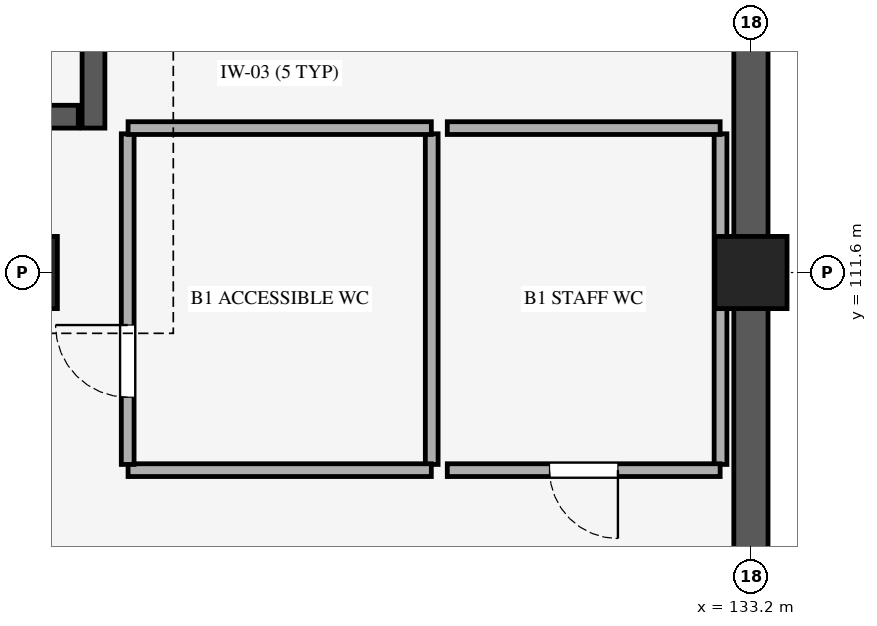
"""IFC4 building model, lengths in metres.
Left out: names, types, materials, properties, quantities, classifications, styles, units other than length and angle.
Written with IfcOpenShell. Run it as: python <this file> out.ifc"""

import sys

from ifc_helpers import new_model, si_unit, direction, frame, frame_2d, origin, origin_2d, place, context, subcontext, project, spatial, rectangle, extrude, element, fill, save


model = new_model("IFC4")
c1 = context("Model", 3, precision=1e-05, world=origin(), true_north=direction((0.0, 1.0)))
c2 = subcontext(c1, "Body", "Model", "MODEL_VIEW")
j1 = project(units=[si_unit("LENGTHUNIT", "METRE"), si_unit("PLANEANGLEUNIT", "RADIAN")], contexts=[c1])
p1 = place(None, origin())
s1 = spatial("IfcSite", under=j1, at=p1, CompositionType="ELEMENT")
p2 = place(p1, origin())
s2 = spatial("IfcBuilding", under=s1, at=p2, CompositionType="ELEMENT")
p3 = place(p2, frame((0.0, 0.0, -4.8)))
s3 = spatial("IfcBuildingStorey", under=s2, at=p3, CompositionType="ELEMENT", Elevation=-4.8)
for number, where, z_axis, x_axis in (
    (1, (123.6, 111.6, 0.0), (0.0, 0.0, 1.0), (1.0, 0.0, 0.0)),
    (2, (133.2, 111.6, 0.0), (0.0, 0.0, 1.0), (1.0, 0.0, 0.0)),
):
    element("IfcColumn", number, at=place(p3, frame(where, z_axis=z_axis, x_axis=x_axis)), inside=s3, PredefinedType="COLUMN", context=c2, shape_type="SweptSolid", body=[
        extrude(rectangle(XDim=0.95, YDim=0.95, at=origin_2d()), origin(), (0.0, 0.0, 1.0), 4.8),
    ])
p4 = place(p3, frame((133.2, 118.56, 0.0), z_axis=(0.0, 0.0, 1.0), x_axis=(0.0, -1.0, 0.0)))
e3 = element("IfcWall", 3, at=p4, inside=s3, PredefinedType="USERDEFINED", context=c2, shape_type="SweptSolid", body=[
    extrude(rectangle(XDim=22.32, YDim=0.45, at=frame_2d((11.16, 0.0))), origin(), (0.0, 0.0, 1.0), 4.47),
])
p5 = place(p3, frame((116.25, 113.65, 0.0), z_axis=(0.0, 0.0, 1.0), x_axis=(1.0, 0.0, 0.0)))
e4 = element("IfcWall", 4, at=p5, inside=s3, PredefinedType="SHEAR", context=c2, shape_type="SweptSolid", body=[
    extrude(rectangle(XDim=8.1, YDim=0.3, at=frame_2d((4.05, 0.0))), origin(), (0.0, 0.0, 1.0), 4.46),
])
p6 = place(p3, frame((124.55, 113.5, 0.0), z_axis=(0.0, 0.0, 1.0), x_axis=(0.0, 1.0, 0.0)))
e5 = element("IfcWall", 5, at=p6, inside=s3, PredefinedType="SHEAR", context=c2, shape_type="SweptSolid", body=[
    extrude(rectangle(XDim=3.9, YDim=0.3, at=frame_2d((1.95, 0.0))), origin(), (0.0, 0.0, 1.0), 4.46),
])
p7 = place(p3, frame((129.0, 113.425, 0.0), z_axis=(0.0, 0.0, 1.0), x_axis=(0.0, -1.0, 0.0)))
e6 = element("IfcWall", 6, at=p7, inside=s3, PredefinedType="STANDARD", context=c2, shape_type="SweptSolid", body=[
    extrude(rectangle(XDim=4.35, YDim=0.168, at=frame_2d((2.175, 0.0))), origin(), (0.0, 0.0, 1.0), 3.5),
])
p8 = place(p3, frame((128.995, 109.0, 0.0), z_axis=(0.0, 0.0, 1.0), x_axis=(-1.0, 0.0, 0.0)))
e7 = element("IfcWall", 7, at=p8, inside=s3, PredefinedType="STANDARD", context=c2, shape_type="SweptSolid", body=[
    extrude(rectangle(XDim=3.99, YDim=0.168, at=frame_2d((1.995, 0.0))), origin(), (0.0, 0.0, 1.0), 4.45),
])
p9 = place(p3, frame((125.0, 109.075, 0.0), z_axis=(0.0, 0.0, 1.0), x_axis=(0.0, 1.0, 0.0)))
e8 = element("IfcWall", 8, at=p9, inside=s3, PredefinedType="STANDARD", context=c2, shape_type="SweptSolid", body=[
    extrude(rectangle(XDim=4.35, YDim=0.168, at=frame_2d((2.175, 0.0))), origin(), (0.0, 0.0, 1.0), 3.5),
])
p10 = place(p9, frame((0.884, 0.0, 0.0)))
e9 = element("IfcOpeningElement", 9, at=p10, cuts=e8, PredefinedType="OPENING", context=c2, shape_type="SweptSolid", body=[
    extrude(rectangle(XDim=0.95, YDim=2.1, at=frame_2d((0.475, 1.05))), frame((0.0, 0.094, 0.0), z_axis=(0.0, -1.0, 0.0), x_axis=(1.0, 0.0, 0.0)), (0.0, 0.0, 1.0), 0.188),
])
p11 = place(p3, frame((125.005, 113.5, 0.0), z_axis=(0.0, 0.0, 1.0), x_axis=(1.0, 0.0, 0.0)))
e10 = element("IfcWall", 10, at=p11, inside=s3, PredefinedType="STANDARD", context=c2, shape_type="SweptSolid", body=[
    extrude(rectangle(XDim=3.99, YDim=0.168, at=frame_2d((1.995, 0.0))), origin(), (0.0, 0.0, 1.0), 4.45),
])
p12 = place(p3, frame((132.8, 113.425, 0.0), z_axis=(0.0, 0.0, 1.0), x_axis=(0.0, -1.0, 0.0)))
e11 = element("IfcWall", 11, at=p12, inside=s3, PredefinedType="STANDARD", context=c2, shape_type="SweptSolid", body=[
    extrude(rectangle(XDim=4.35, YDim=0.168, at=frame_2d((2.175, 0.0))), origin(), (0.0, 0.0, 1.0), 3.5),
])
p13 = place(p3, frame((132.795, 109.0, 0.0), z_axis=(0.0, 0.0, 1.0), x_axis=(-1.0, 0.0, 0.0)))
e12 = element("IfcWall", 12, at=p13, inside=s3, PredefinedType="STANDARD", context=c2, shape_type="SweptSolid", body=[
    extrude(rectangle(XDim=3.59, YDim=0.168, at=frame_2d((1.795, 0.0))), origin(), (0.0, 0.0, 1.0), 4.45),
])
p14 = place(p13, frame((1.345, 0.0, 0.0)))
e13 = element("IfcOpeningElement", 13, at=p14, cuts=e12, PredefinedType="OPENING", context=c2, shape_type="SweptSolid", body=[
    extrude(rectangle(XDim=0.9, YDim=2.1, at=frame_2d((0.45, 1.05))), frame((0.0, 0.094, 0.0), z_axis=(0.0, -1.0, 0.0), x_axis=(1.0, 0.0, 0.0)), (0.0, 0.0, 1.0), 0.188),
])
p15 = place(p3, frame((129.205, 113.5, 0.0), z_axis=(0.0, 0.0, 1.0), x_axis=(1.0, 0.0, 0.0)))
e14 = element("IfcWall", 14, at=p15, inside=s3, PredefinedType="STANDARD", context=c2, shape_type="SweptSolid", body=[
    extrude(rectangle(XDim=3.59, YDim=0.168, at=frame_2d((1.795, 0.0))), origin(), (0.0, 0.0, 1.0), 4.45),
])
p16 = place(p10, origin())
e15 = element("IfcDoor", 15, at=p16, inside=s3, OperationType="SINGLE_SWING_RIGHT", PredefinedType="DOOR", context=c2, shape_type="SweptSolid", body=[
    extrude(rectangle(XDim=0.95, YDim=2.1, at=frame_2d((0.475, 1.05))), frame((0.0, 0.025, 0.0), z_axis=(0.0, -1.0, 0.0), x_axis=(1.0, 0.0, 0.0)), (0.0, 0.0, 1.0), 0.05),
])
fill(e9, e15)
p17 = place(p14, origin())
e16 = element("IfcDoor", 16, at=p17, inside=s3, OperationType="SINGLE_SWING_LEFT", PredefinedType="DOOR", context=c2, shape_type="SweptSolid", body=[
    extrude(rectangle(XDim=0.9, YDim=2.1, at=frame_2d((0.45, 1.05))), frame((0.0, 0.025, 0.0), z_axis=(0.0, -1.0, 0.0), x_axis=(1.0, 0.0, 0.0)), (0.0, 0.0, 1.0), 0.05),
])
fill(e13, e16)
save(model, sys.argv[1])
